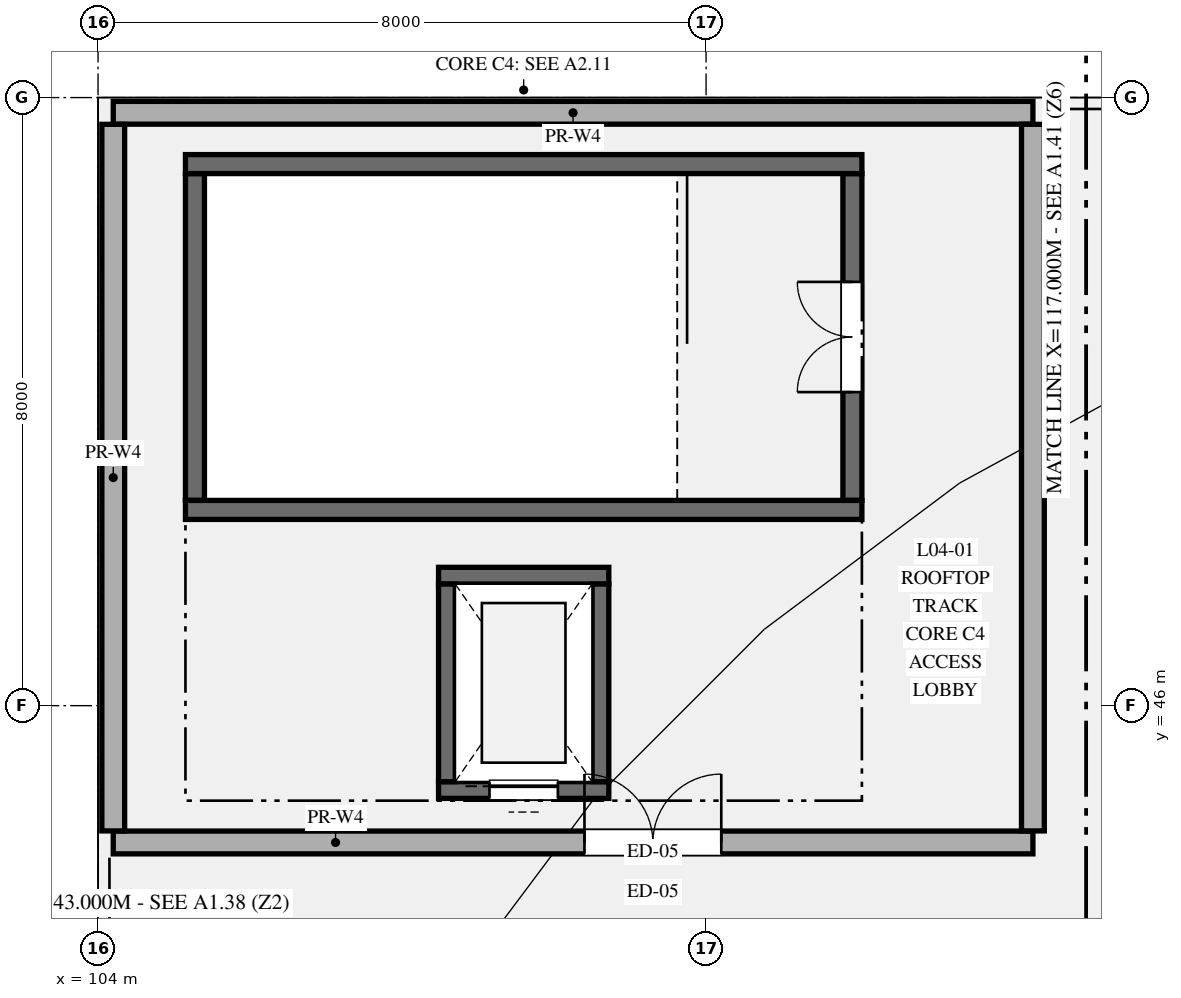
"""IFC4 building model, lengths in metres.
Left out: names, types, materials, properties, quantities, classifications, styles, units other than length and angle.
Written with IfcOpenShell. Run it as: python <this file> out.ifc"""

import sys

from ifc_helpers import new_model, si_unit, direction, frame, frame_2d, origin, place, context, subcontext, project, spatial, rectangle, extrude, element, fill, save


model = new_model("IFC4")
c1 = context("Model", 3, precision=1e-05, world=origin(), true_north=direction((0.0, 1.0)))
c2 = subcontext(c1, "Body", "Model", "MODEL_VIEW")
j1 = project(units=[si_unit("LENGTHUNIT", "METRE"), si_unit("PLANEANGLEUNIT", "RADIAN")], contexts=[c1])
p1 = place(None, origin())
s1 = spatial("IfcSite", under=j1, at=p1, CompositionType="ELEMENT")
p2 = place(p1, origin())
s2 = spatial("IfcBuilding", under=s1, at=p2, CompositionType="ELEMENT")
p3 = place(p2, frame((0.0, 0.0, 18.6)))
s3 = spatial("IfcBuildingStorey", under=s2, at=p3, CompositionType="ELEMENT", Elevation=18.6)
p4 = place(p3, frame((104.2, 44.2, 0.0), z_axis=(0.0, 0.0, 1.0), x_axis=(1.0, 0.0, 0.0)))
e1 = element("IfcWall", 1, at=p4, inside=s3, PredefinedType="STANDARD", context=c2, shape_type="SweptSolid", body=[
    extrude(rectangle(XDim=12.1, YDim=0.3, at=frame_2d((6.05, 0.0))), origin(), (0.0, 0.0, 1.0), 3.36),
])
p5 = place(p4, frame((6.2, 0.0, 0.0)))
e2 = element("IfcOpeningElement", 2, at=p5, cuts=e1, PredefinedType="OPENING", context=c2, shape_type="SweptSolid", body=[
    extrude(rectangle(XDim=1.8, YDim=2.25, at=frame_2d((0.9, 1.125))), frame((0.0, 0.16, 0.0), z_axis=(0.0, -1.0, 0.0), x_axis=(1.0, 0.0, 0.0)), (0.0, 0.0, 1.0), 0.32),
])
p6 = place(p3, frame((116.3, 53.8, 0.0), z_axis=(0.0, 0.0, 1.0), x_axis=(-1.0, 0.0, 0.0)))
e3 = element("IfcWall", 3, at=p6, inside=s3, PredefinedType="STANDARD", context=c2, shape_type="SweptSolid", body=[
    extrude(rectangle(XDim=12.1, YDim=0.3, at=frame_2d((6.05, 0.0))), origin(), (0.0, 0.0, 1.0), 3.36),
])
for number, where, z_axis, x_axis in (
    (4, (104.2, 53.648, 0.0), (0.0, 0.0, 1.0), (0.0, -1.0, 0.0)),
    (5, (116.3, 44.352, 0.0), (0.0, 0.0, 1.0), (0.0, 1.0, 0.0)),
):
    element("IfcWall", number, at=place(p3, frame(where, z_axis=z_axis, x_axis=x_axis)), inside=s3, PredefinedType="STANDARD", context=c2, shape_type="SweptSolid", body=[
        extrude(rectangle(XDim=9.296, YDim=0.3, at=frame_2d((4.648, 0.0))), origin(), (0.0, 0.0, 1.0), 3.36),
    ])
p7 = place(p3, frame((113.925, 48.7, 0.0), z_axis=(0.0, 0.0, 1.0), x_axis=(0.0, 1.0, 0.0)))
e6 = element("IfcWall", 6, at=p7, inside=s3, PredefinedType="SHEAR", context=c2, shape_type="SweptSolid", body=[
    extrude(rectangle(XDim=4.3, YDim=0.25, at=frame_2d((2.15, 0.0))), origin(), (0.0, 0.0, 1.0), 3.6),
])
p8 = place(p7, frame((1.425, 0.0, 0.0)))
e7 = element("IfcOpeningElement", 7, at=p8, cuts=e6, PredefinedType="OPENING", context=c2, shape_type="SweptSolid", body=[
    extrude(rectangle(XDim=1.45, YDim=2.2, at=frame_2d((0.725, 1.1))), frame((0.0, 0.135, 0.0), z_axis=(0.0, -1.0, 0.0), x_axis=(1.0, 0.0, 0.0)), (0.0, 0.0, 1.0), 0.27),
])
p9 = place(p3, frame((105.275, 53.0, 0.0), z_axis=(0.0, 0.0, 1.0), x_axis=(0.0, -1.0, 0.0)))
e8 = element("IfcWall", 8, at=p9, inside=s3, PredefinedType="SHEAR", context=c2, shape_type="SweptSolid", body=[
    extrude(rectangle(XDim=4.3, YDim=0.25, at=frame_2d((2.15, 0.0))), origin(), (0.0, 0.0, 1.0), 3.6),
])
for number, where, z_axis, x_axis in (
    (9, (105.15, 48.575, 0.0), (0.0, 0.0, 1.0), (1.0, 0.0, 0.0)),
    (10, (114.05, 53.125, 0.0), (0.0, 0.0, 1.0), (-1.0, 0.0, 0.0)),
):
    element("IfcWall", number, at=place(p3, frame(where, z_axis=z_axis, x_axis=x_axis)), inside=s3, PredefinedType="SHEAR", context=c2, shape_type="SweptSolid", body=[
        extrude(rectangle(XDim=8.9, YDim=0.25, at=frame_2d((4.45, 0.0))), origin(), (0.0, 0.0, 1.0), 3.6),
    ])
p10 = place(p3, frame((108.48, 44.89, 0.0), z_axis=(0.0, 0.0, 1.0), x_axis=(1.0, 0.0, 0.0)))
e11 = element("IfcWall", 11, at=p10, inside=s3, PredefinedType="SHEAR", context=c2, shape_type="SweptSolid", body=[
    extrude(rectangle(XDim=2.24, YDim=0.22, at=frame_2d((1.12, 0.0))), origin(), (0.0, 0.0, 1.0), 3.75),
])
p11 = place(p10, frame((0.67, 0.0, 0.0)))
e12 = element("IfcOpeningElement", 12, at=p11, cuts=e11, PredefinedType="OPENING", context=c2, shape_type="SweptSolid", body=[
    extrude(rectangle(XDim=0.9, YDim=2.15, at=frame_2d((0.45, 1.075))), frame((0.0, 0.12, 0.0), z_axis=(0.0, -1.0, 0.0), x_axis=(1.0, 0.0, 0.0)), (0.0, 0.0, 1.0), 0.24),
])
p12 = place(p3, frame((110.72, 47.71, 0.0), z_axis=(0.0, 0.0, 1.0), x_axis=(-1.0, 0.0, 0.0)))
e13 = element("IfcWall", 13, at=p12, inside=s3, PredefinedType="SHEAR", context=c2, shape_type="SweptSolid", body=[
    extrude(rectangle(XDim=2.24, YDim=0.22, at=frame_2d((1.12, 0.0))), origin(), (0.0, 0.0, 1.0), 3.75),
])
for number, where, z_axis, x_axis in (
    (14, (108.59, 47.6, 0.0), (0.0, 0.0, 1.0), (0.0, -1.0, 0.0)),
    (15, (110.61, 45.0, 0.0), (0.0, 0.0, 1.0), (0.0, 1.0, 0.0)),
):
    element("IfcWall", number, at=place(p3, frame(where, z_axis=z_axis, x_axis=x_axis)), inside=s3, PredefinedType="SHEAR", context=c2, shape_type="SweptSolid", body=[
        extrude(rectangle(XDim=2.6, YDim=0.22, at=frame_2d((1.3, 0.0))), origin(), (0.0, 0.0, 1.0), 3.75),
    ])
p13 = place(p5, origin())
e16 = element("IfcDoor", 16, at=p13, inside=s3, OperationType="DOUBLE_DOOR_SINGLE_SWING", PredefinedType="DOOR", context=c2, shape_type="SweptSolid", body=[
    extrude(rectangle(XDim=1.8, YDim=2.25, at=frame_2d((0.9, 1.125))), frame((0.0, 0.025, 0.0), z_axis=(0.0, -1.0, 0.0), x_axis=(1.0, 0.0, 0.0)), (0.0, 0.0, 1.0), 0.05),
])
fill(e2, e16)
p14 = place(p8, origin())
e17 = element("IfcDoor", 17, at=p14, inside=s3, OperationType="DOUBLE_DOOR_SINGLE_SWING", PredefinedType="DOOR", context=c2, shape_type="SweptSolid", body=[
    extrude(rectangle(XDim=1.45, YDim=2.2, at=frame_2d((0.725, 1.1))), frame((0.0, 0.025, 0.0), z_axis=(0.0, -1.0, 0.0), x_axis=(1.0, 0.0, 0.0)), (0.0, 0.0, 1.0), 0.05),
])
fill(e7, e17)
p15 = place(p11, origin())
e18 = element("IfcDoor", 18, at=p15, inside=s3, OperationType="SLIDING_TO_LEFT", PredefinedType="DOOR", context=c2, shape_type="SweptSolid", body=[
    extrude(rectangle(XDim=0.9, YDim=2.15, at=frame_2d((0.45, 1.075))), frame((0.0, 0.025, 0.0), z_axis=(0.0, -1.0, 0.0), x_axis=(1.0, 0.0, 0.0)), (0.0, 0.0, 1.0), 0.05),
])
fill(e12, e18)
save(model, sys.argv[1])
